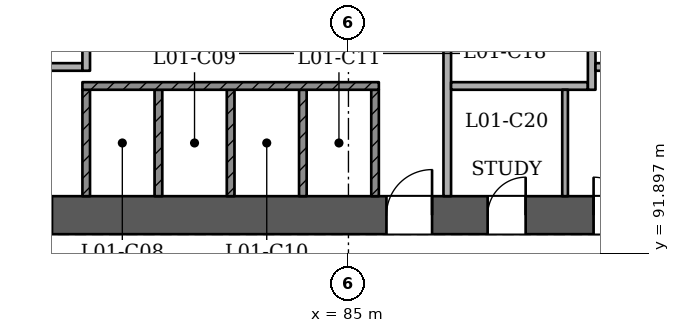
"""IFC4 building model, lengths in metres.
Left out: names, types, materials, properties, quantities, classifications, styles, units other than length and angle.
Written with IfcOpenShell. Run it as: python <this file> out.ifc"""

import sys

from ifc_helpers import new_model, si_unit, direction, frame, frame_2d, origin, place, context, subcontext, project, spatial, rectangle, extrude, element, fill, save


model = new_model("IFC4")
c1 = context("Model", 3, precision=1e-05, world=origin(), true_north=direction((0.0, 1.0)))
c2 = subcontext(c1, "Body", "Model", "MODEL_VIEW")
j1 = project(units=[si_unit("LENGTHUNIT", "METRE"), si_unit("PLANEANGLEUNIT", "RADIAN")], contexts=[c1])
p1 = place(None, origin())
s1 = spatial("IfcSite", under=j1, at=p1, CompositionType="ELEMENT")
p2 = place(p1, origin())
s2 = spatial("IfcBuilding", under=s1, at=p2, CompositionType="ELEMENT")
p3 = place(p2, frame((0.0, 0.0, 9.0)))
s3 = spatial("IfcBuildingStorey", under=s2, at=p3, CompositionType="ELEMENT", Elevation=9.0)
p4 = place(p3, frame((72.5, 92.9, 0.0), z_axis=(0.0, 0.0, 1.0), x_axis=(1.0, 0.0, 0.0)))
e1 = element("IfcWall", 1, at=p4, inside=s3, PredefinedType="SHEAR", context=c2, shape_type="SweptSolid", body=[
    extrude(rectangle(XDim=25.5, YDim=1.0, at=frame_2d((12.75, 0.0))), origin(), (0.0, 0.0, 1.0), 4.5),
])
p5 = place(p4, frame((1.3, 0.0, 0.0)))
e2 = element("IfcOpeningElement", 2, at=p5, cuts=e1, PredefinedType="OPENING", context=c2, shape_type="SweptSolid", body=[
    extrude(rectangle(XDim=1.2, YDim=2.1, at=frame_2d((0.6, 1.05))), frame((0.0, 0.51, 0.0), z_axis=(0.0, -1.0, 0.0), x_axis=(1.0, 0.0, 0.0)), (0.0, 0.0, 1.0), 1.021),
])
p6 = place(p4, frame((3.5, 0.0, 0.0)))
e3 = element("IfcOpeningElement", 3, at=p6, cuts=e1, PredefinedType="OPENING", context=c2, shape_type="SweptSolid", body=[
    extrude(rectangle(XDim=1.2, YDim=2.1, at=frame_2d((0.6, 1.05))), frame((0.0, 0.51, 0.0), z_axis=(0.0, -1.0, 0.0), x_axis=(1.0, 0.0, 0.0)), (0.0, 0.0, 1.0), 1.021),
])
p7 = place(p4, frame((13.5, 0.0, 0.0)))
e4 = element("IfcOpeningElement", 4, at=p7, cuts=e1, PredefinedType="OPENING", context=c2, shape_type="SweptSolid", body=[
    extrude(rectangle(XDim=1.2, YDim=2.1, at=frame_2d((0.6, 1.05))), frame((0.0, 0.51, 0.0), z_axis=(0.0, -1.0, 0.0), x_axis=(1.0, 0.0, 0.0)), (0.0, 0.0, 1.0), 1.021),
])
p8 = place(p4, frame((16.163, 0.0, 0.0)))
e5 = element("IfcOpeningElement", 5, at=p8, cuts=e1, PredefinedType="OPENING", context=c2, shape_type="SweptSolid", body=[
    extrude(rectangle(XDim=1.0, YDim=2.1, at=frame_2d((0.5, 1.05))), frame((0.0, 0.51, 0.0), z_axis=(0.0, -1.0, 0.0), x_axis=(1.0, 0.0, 0.0)), (0.0, 0.0, 1.0), 1.021),
])
p9 = place(p4, frame((18.95, 0.0, 0.0)))
e6 = element("IfcOpeningElement", 6, at=p9, cuts=e1, PredefinedType="OPENING", context=c2, shape_type="SweptSolid", body=[
    extrude(rectangle(XDim=1.0, YDim=2.1, at=frame_2d((0.5, 1.05))), frame((0.0, 0.51, 0.0), z_axis=(0.0, -1.0, 0.0), x_axis=(1.0, 0.0, 0.0)), (0.0, 0.0, 1.0), 1.021),
])
p10 = place(p4, frame((22.137, 0.0, 0.0)))
e7 = element("IfcOpeningElement", 7, at=p10, cuts=e1, PredefinedType="OPENING", context=c2, shape_type="SweptSolid", body=[
    extrude(rectangle(XDim=1.0, YDim=2.1, at=frame_2d((0.5, 1.05))), frame((0.0, 0.51, 0.0), z_axis=(0.0, -1.0, 0.0), x_axis=(1.0, 0.0, 0.0)), (0.0, 0.0, 1.0), 1.021),
])
p11 = place(p3, frame((55.57, 95.474, 0.0), z_axis=(0.0, 0.0, 1.0), x_axis=(0.500000085768, -0.866025354266, 0.0)))
e8 = element("IfcWall", 8, at=p11, inside=s3, PredefinedType="PARTITIONING", context=c2, shape_type="SweptSolid", body=[
    extrude(rectangle(XDim=55.365, YDim=0.15, at=frame_2d((27.682, 0.0))), origin(), (0.0, 0.0, 1.0), 4.05),
])
p12 = place(p11, frame((6.832, 0.0, 0.0)))
e9 = element("IfcOpeningElement", 9, at=p12, cuts=e8, PredefinedType="OPENING", context=c2, shape_type="SweptSolid", body=[
    extrude(rectangle(XDim=1.2, YDim=2.1, at=frame_2d((0.6, 1.05))), frame((0.0, 0.085, 0.0), z_axis=(0.0, -1.0, 0.0), x_axis=(1.0, 0.0, 0.0)), (0.0, 0.0, 1.0), 0.171),
])
p13 = place(p11, frame((18.182, 0.0, 0.0)))
e10 = element("IfcOpeningElement", 10, at=p13, cuts=e8, PredefinedType="OPENING", context=c2, shape_type="SweptSolid", body=[
    extrude(rectangle(XDim=1.0, YDim=2.1, at=frame_2d((0.5, 1.05))), frame((0.0, 0.085, 0.0), z_axis=(0.0, -1.0, 0.0), x_axis=(1.0, 0.0, 0.0)), (0.0, 0.0, 1.0), 0.171),
])
p14 = place(p11, frame((30.132, 0.0, 0.0)))
e11 = element("IfcOpeningElement", 11, at=p14, cuts=e8, PredefinedType="OPENING", context=c2, shape_type="SweptSolid", body=[
    extrude(rectangle(XDim=1.2, YDim=2.1, at=frame_2d((0.6, 1.05))), frame((0.0, 0.085, 0.0), z_axis=(0.0, -1.0, 0.0), x_axis=(1.0, 0.0, 0.0)), (0.0, 0.0, 1.0), 0.171),
])
p15 = place(p11, frame((40.582, 0.0, 0.0)))
e12 = element("IfcOpeningElement", 12, at=p15, cuts=e8, PredefinedType="OPENING", context=c2, shape_type="SweptSolid", body=[
    extrude(rectangle(XDim=1.2, YDim=2.1, at=frame_2d((0.6, 1.05))), frame((0.0, 0.085, 0.0), z_axis=(0.0, -1.0, 0.0), x_axis=(1.0, 0.0, 0.0)), (0.0, 0.0, 1.0), 0.171),
])
p16 = place(p11, frame((46.315, 0.0, 0.0)))
e13 = element("IfcOpeningElement", 13, at=p16, cuts=e8, PredefinedType="OPENING", context=c2, shape_type="SweptSolid", body=[
    extrude(rectangle(XDim=0.9, YDim=2.1, at=frame_2d((0.45, 1.05))), frame((0.0, 0.085, 0.0), z_axis=(0.0, -1.0, 0.0), x_axis=(1.0, 0.0, 0.0)), (0.0, 0.0, 1.0), 0.171),
])
p17 = place(p11, frame((48.565, 0.0, 0.0)))
e14 = element("IfcOpeningElement", 14, at=p17, cuts=e8, PredefinedType="OPENING", context=c2, shape_type="SweptSolid", body=[
    extrude(rectangle(XDim=0.9, YDim=2.1, at=frame_2d((0.45, 1.05))), frame((0.0, 0.085, 0.0), z_axis=(0.0, -1.0, 0.0), x_axis=(1.0, 0.0, 0.0)), (0.0, 0.0, 1.0), 0.171),
])
p18 = place(p11, frame((53.195, 0.0, 0.0)))
e15 = element("IfcOpeningElement", 15, at=p18, cuts=e8, PredefinedType="OPENING", context=c2, shape_type="SweptSolid", body=[
    extrude(rectangle(XDim=1.2, YDim=2.1, at=frame_2d((0.6, 1.05))), frame((0.0, 0.085, 0.0), z_axis=(0.0, -1.0, 0.0), x_axis=(1.0, 0.0, 0.0)), (0.0, 0.0, 1.0), 0.171),
])
p19 = place(p3, frame((86.747, 47.526, 0.0), z_axis=(0.0, 0.0, 1.0), x_axis=(0.500000085768, 0.866025354266, 0.0)))
e16 = element("IfcWall", 16, at=p19, inside=s3, PredefinedType="PARTITIONING", context=c2, shape_type="SweptSolid", body=[
    extrude(rectangle(XDim=55.365, YDim=0.15, at=frame_2d((27.682, 0.0))), origin(), (0.0, 0.0, 1.0), 4.05),
])
p20 = place(p19, frame((0.97, 0.0, 0.0)))
e17 = element("IfcOpeningElement", 17, at=p20, cuts=e16, PredefinedType="OPENING", context=c2, shape_type="SweptSolid", body=[
    extrude(rectangle(XDim=1.2, YDim=2.1, at=frame_2d((0.6, 1.05))), frame((0.0, 0.085, 0.0), z_axis=(0.0, -1.0, 0.0), x_axis=(1.0, 0.0, 0.0)), (0.0, 0.0, 1.0), 0.171),
])
p21 = place(p19, frame((9.082, 0.0, 0.0)))
e18 = element("IfcOpeningElement", 18, at=p21, cuts=e16, PredefinedType="OPENING", context=c2, shape_type="SweptSolid", body=[
    extrude(rectangle(XDim=1.2, YDim=2.1, at=frame_2d((0.6, 1.05))), frame((0.0, 0.085, 0.0), z_axis=(0.0, -1.0, 0.0), x_axis=(1.0, 0.0, 0.0)), (0.0, 0.0, 1.0), 0.171),
])
p22 = place(p19, frame((18.082, 0.0, 0.0)))
e19 = element("IfcOpeningElement", 19, at=p22, cuts=e16, PredefinedType="OPENING", context=c2, shape_type="SweptSolid", body=[
    extrude(rectangle(XDim=1.2, YDim=2.1, at=frame_2d((0.6, 1.05))), frame((0.0, 0.085, 0.0), z_axis=(0.0, -1.0, 0.0), x_axis=(1.0, 0.0, 0.0)), (0.0, 0.0, 1.0), 0.171),
])
p23 = place(p19, frame((23.613, 0.0, 0.0)))
e20 = element("IfcOpeningElement", 20, at=p23, cuts=e16, PredefinedType="OPENING", context=c2, shape_type="SweptSolid", body=[
    extrude(rectangle(XDim=1.0, YDim=2.1, at=frame_2d((0.5, 1.05))), frame((0.0, 0.085, 0.0), z_axis=(0.0, -1.0, 0.0), x_axis=(1.0, 0.0, 0.0)), (0.0, 0.0, 1.0), 0.171),
])
p24 = place(p19, frame((26.363, 0.0, 0.0)))
e21 = element("IfcOpeningElement", 21, at=p24, cuts=e16, PredefinedType="OPENING", context=c2, shape_type="SweptSolid", body=[
    extrude(rectangle(XDim=1.0, YDim=2.1, at=frame_2d((0.5, 1.05))), frame((0.0, 0.085, 0.0), z_axis=(0.0, -1.0, 0.0), x_axis=(1.0, 0.0, 0.0)), (0.0, 0.0, 1.0), 0.171),
])
p25 = place(p19, frame((33.032, 0.0, 0.0)))
e22 = element("IfcOpeningElement", 22, at=p25, cuts=e16, PredefinedType="OPENING", context=c2, shape_type="SweptSolid", body=[
    extrude(rectangle(XDim=1.2, YDim=2.1, at=frame_2d((0.6, 1.05))), frame((0.0, 0.085, 0.0), z_axis=(0.0, -1.0, 0.0), x_axis=(1.0, 0.0, 0.0)), (0.0, 0.0, 1.0), 0.171),
])
p26 = place(p19, frame((47.337, 0.0, 0.0)))
e23 = element("IfcOpeningElement", 23, at=p26, cuts=e16, PredefinedType="OPENING", context=c2, shape_type="SweptSolid", body=[
    extrude(rectangle(XDim=1.2, YDim=2.1, at=frame_2d((0.6, 1.05))), frame((0.0, 0.085, 0.0), z_axis=(0.0, -1.0, 0.0), x_axis=(1.0, 0.0, 0.0)), (0.0, 0.0, 1.0), 0.171),
])
p27 = place(p3, frame((79.673, 41.126, 0.0), z_axis=(0.0, 0.0, 1.0), x_axis=(-0.499997306052, 0.866026959131, 0.0)))
e24 = element("IfcWall", 24, at=p27, inside=s3, PredefinedType="SOLIDWALL", context=c2, shape_type="SweptSolid", body=[
    extrude(rectangle(XDim=62.87, YDim=0.4, at=frame_2d((31.435, 0.0))), origin(), (0.0, 0.0, 1.0), 4.05),
])
p28 = place(p27, frame((54.986, 0.0, 0.9)))
e25 = element("IfcOpeningElement", 25, at=p28, cuts=e24, PredefinedType="OPENING", context=c2, shape_type="SweptSolid", body=[
    extrude(rectangle(XDim=2.4, YDim=1.5, at=frame_2d((1.2, 0.75))), frame((0.0, 0.21, 0.0), z_axis=(0.0, -1.0, 0.0), x_axis=(1.0, 0.0, 0.0)), (0.0, 0.0, 1.0), 0.421),
])
p29 = place(p27, frame((50.486, 0.0, 0.9)))
e26 = element("IfcOpeningElement", 26, at=p29, cuts=e24, PredefinedType="OPENING", context=c2, shape_type="SweptSolid", body=[
    extrude(rectangle(XDim=2.4, YDim=1.5, at=frame_2d((1.2, 0.75))), frame((0.0, 0.21, 0.0), z_axis=(0.0, -1.0, 0.0), x_axis=(1.0, 0.0, 0.0)), (0.0, 0.0, 1.0), 0.421),
])
p30 = place(p27, frame((45.986, 0.0, 0.9)))
e27 = element("IfcOpeningElement", 27, at=p30, cuts=e24, PredefinedType="OPENING", context=c2, shape_type="SweptSolid", body=[
    extrude(rectangle(XDim=2.4, YDim=1.5, at=frame_2d((1.2, 0.75))), frame((0.0, 0.21, 0.0), z_axis=(0.0, -1.0, 0.0), x_axis=(1.0, 0.0, 0.0)), (0.0, 0.0, 1.0), 0.421),
])
p31 = place(p27, frame((32.486, 0.0, 0.9)))
e28 = element("IfcOpeningElement", 28, at=p31, cuts=e24, PredefinedType="OPENING", context=c2, shape_type="SweptSolid", body=[
    extrude(rectangle(XDim=2.4, YDim=1.5, at=frame_2d((1.2, 0.75))), frame((0.0, 0.21, 0.0), z_axis=(0.0, -1.0, 0.0), x_axis=(1.0, 0.0, 0.0)), (0.0, 0.0, 1.0), 0.421),
])
p32 = place(p27, frame((27.986, 0.0, 0.9)))
e29 = element("IfcOpeningElement", 29, at=p32, cuts=e24, PredefinedType="OPENING", context=c2, shape_type="SweptSolid", body=[
    extrude(rectangle(XDim=2.4, YDim=1.5, at=frame_2d((1.2, 0.75))), frame((0.0, 0.21, 0.0), z_axis=(0.0, -1.0, 0.0), x_axis=(1.0, 0.0, 0.0)), (0.0, 0.0, 1.0), 0.421),
])
p33 = place(p27, frame((23.486, 0.0, 0.9)))
e30 = element("IfcOpeningElement", 30, at=p33, cuts=e24, PredefinedType="OPENING", context=c2, shape_type="SweptSolid", body=[
    extrude(rectangle(XDim=2.4, YDim=1.5, at=frame_2d((1.2, 0.75))), frame((0.0, 0.21, 0.0), z_axis=(0.0, -1.0, 0.0), x_axis=(1.0, 0.0, 0.0)), (0.0, 0.0, 1.0), 0.421),
])
p34 = place(p27, frame((18.986, 0.0, 0.9)))
e31 = element("IfcOpeningElement", 31, at=p34, cuts=e24, PredefinedType="OPENING", context=c2, shape_type="SweptSolid", body=[
    extrude(rectangle(XDim=2.4, YDim=1.5, at=frame_2d((1.2, 0.75))), frame((0.0, 0.21, 0.0), z_axis=(0.0, -1.0, 0.0), x_axis=(1.0, 0.0, 0.0)), (0.0, 0.0, 1.0), 0.421),
])
p35 = place(p27, frame((14.486, 0.0, 0.9)))
e32 = element("IfcOpeningElement", 32, at=p35, cuts=e24, PredefinedType="OPENING", context=c2, shape_type="SweptSolid", body=[
    extrude(rectangle(XDim=2.4, YDim=1.5, at=frame_2d((1.2, 0.75))), frame((0.0, 0.21, 0.0), z_axis=(0.0, -1.0, 0.0), x_axis=(1.0, 0.0, 0.0)), (0.0, 0.0, 1.0), 0.421),
])
p36 = place(p3, frame((121.762, 95.574, 0.0), z_axis=(0.0, 0.0, 1.0), x_axis=(-0.499997306052, -0.866026959131, 0.0)))
e33 = element("IfcWall", 33, at=p36, inside=s3, PredefinedType="SOLIDWALL", context=c2, shape_type="SweptSolid", body=[
    extrude(rectangle(XDim=62.87, YDim=0.4, at=frame_2d((31.435, 0.0))), origin(), (0.0, 0.0, 1.0), 4.05),
])
p37 = place(p36, frame((59.452, 0.0, 0.9)))
e34 = element("IfcOpeningElement", 34, at=p37, cuts=e33, PredefinedType="OPENING", context=c2, shape_type="SweptSolid", body=[
    extrude(rectangle(XDim=2.4, YDim=1.5, at=frame_2d((1.2, 0.75))), frame((0.0, 0.21, 0.0), z_axis=(0.0, -1.0, 0.0), x_axis=(1.0, 0.0, 0.0)), (0.0, 0.0, 1.0), 0.421),
])
p38 = place(p36, frame((54.986, 0.0, 0.9)))
e35 = element("IfcOpeningElement", 35, at=p38, cuts=e33, PredefinedType="OPENING", context=c2, shape_type="SweptSolid", body=[
    extrude(rectangle(XDim=2.4, YDim=1.5, at=frame_2d((1.2, 0.75))), frame((0.0, 0.21, 0.0), z_axis=(0.0, -1.0, 0.0), x_axis=(1.0, 0.0, 0.0)), (0.0, 0.0, 1.0), 0.421),
])
p39 = place(p36, frame((50.486, 0.0, 0.9)))
e36 = element("IfcOpeningElement", 36, at=p39, cuts=e33, PredefinedType="OPENING", context=c2, shape_type="SweptSolid", body=[
    extrude(rectangle(XDim=2.4, YDim=1.5, at=frame_2d((1.2, 0.75))), frame((0.0, 0.21, 0.0), z_axis=(0.0, -1.0, 0.0), x_axis=(1.0, 0.0, 0.0)), (0.0, 0.0, 1.0), 0.421),
])
p40 = place(p36, frame((45.986, 0.0, 0.9)))
e37 = element("IfcOpeningElement", 37, at=p40, cuts=e33, PredefinedType="OPENING", context=c2, shape_type="SweptSolid", body=[
    extrude(rectangle(XDim=2.4, YDim=1.5, at=frame_2d((1.2, 0.75))), frame((0.0, 0.21, 0.0), z_axis=(0.0, -1.0, 0.0), x_axis=(1.0, 0.0, 0.0)), (0.0, 0.0, 1.0), 0.421),
])
p41 = place(p36, frame((41.486, 0.0, 0.9)))
e38 = element("IfcOpeningElement", 38, at=p41, cuts=e33, PredefinedType="OPENING", context=c2, shape_type="SweptSolid", body=[
    extrude(rectangle(XDim=2.4, YDim=1.5, at=frame_2d((1.2, 0.75))), frame((0.0, 0.21, 0.0), z_axis=(0.0, -1.0, 0.0), x_axis=(1.0, 0.0, 0.0)), (0.0, 0.0, 1.0), 0.421),
])
p42 = place(p36, frame((36.986, 0.0, 0.9)))
e39 = element("IfcOpeningElement", 39, at=p42, cuts=e33, PredefinedType="OPENING", context=c2, shape_type="SweptSolid", body=[
    extrude(rectangle(XDim=2.4, YDim=1.5, at=frame_2d((1.2, 0.75))), frame((0.0, 0.21, 0.0), z_axis=(0.0, -1.0, 0.0), x_axis=(1.0, 0.0, 0.0)), (0.0, 0.0, 1.0), 0.421),
])
p43 = place(p36, frame((23.486, 0.0, 0.9)))
e40 = element("IfcOpeningElement", 40, at=p43, cuts=e33, PredefinedType="OPENING", context=c2, shape_type="SweptSolid", body=[
    extrude(rectangle(XDim=2.4, YDim=1.5, at=frame_2d((1.2, 0.75))), frame((0.0, 0.21, 0.0), z_axis=(0.0, -1.0, 0.0), x_axis=(1.0, 0.0, 0.0)), (0.0, 0.0, 1.0), 0.421),
])
p44 = place(p36, frame((18.986, 0.0, 0.9)))
e41 = element("IfcOpeningElement", 41, at=p44, cuts=e33, PredefinedType="OPENING", context=c2, shape_type="SweptSolid", body=[
    extrude(rectangle(XDim=2.4, YDim=1.5, at=frame_2d((1.2, 0.75))), frame((0.0, 0.21, 0.0), z_axis=(0.0, -1.0, 0.0), x_axis=(1.0, 0.0, 0.0)), (0.0, 0.0, 1.0), 0.421),
])
p45 = place(p36, frame((14.486, 0.0, 0.9)))
e42 = element("IfcOpeningElement", 42, at=p45, cuts=e33, PredefinedType="OPENING", context=c2, shape_type="SweptSolid", body=[
    extrude(rectangle(XDim=2.4, YDim=1.5, at=frame_2d((1.2, 0.75))), frame((0.0, 0.21, 0.0), z_axis=(0.0, -1.0, 0.0), x_axis=(1.0, 0.0, 0.0)), (0.0, 0.0, 1.0), 0.421),
])
p46 = place(p36, frame((5.486, 0.0, 0.9)))
e43 = element("IfcOpeningElement", 43, at=p46, cuts=e33, PredefinedType="OPENING", context=c2, shape_type="SweptSolid", body=[
    extrude(rectangle(XDim=2.4, YDim=1.5, at=frame_2d((1.2, 0.75))), frame((0.0, 0.21, 0.0), z_axis=(0.0, -1.0, 0.0), x_axis=(1.0, 0.0, 0.0)), (0.0, 0.0, 1.0), 0.421),
])
p47 = place(p36, frame((1.018, 0.0, 0.9)))
e44 = element("IfcOpeningElement", 44, at=p47, cuts=e33, PredefinedType="OPENING", context=c2, shape_type="SweptSolid", body=[
    extrude(rectangle(XDim=2.4, YDim=1.5, at=frame_2d((1.2, 0.75))), frame((0.0, 0.21, 0.0), z_axis=(0.0, -1.0, 0.0), x_axis=(1.0, 0.0, 0.0)), (0.0, 0.0, 1.0), 0.421),
])
for number, where, z_axis, x_axis in (
    (45, (78.1, 93.4, 0.0), (0.0, 0.0, 1.0), (0.0, 1.0, 0.0)),
    (46, (80.0, 93.4, 0.0), (0.0, 0.0, 1.0), (0.0, 1.0, 0.0)),
    (47, (81.9, 93.4, 0.0), (0.0, 0.0, 1.0), (0.0, 1.0, 0.0)),
    (48, (83.8, 93.4, 0.0), (0.0, 0.0, 1.0), (0.0, 1.0, 0.0)),
    (49, (85.7, 93.4, 0.0), (0.0, 0.0, 1.0), (0.0, 1.0, 0.0)),
):
    element("IfcWall", number, at=place(p3, frame(where, z_axis=z_axis, x_axis=x_axis)), inside=s3, PredefinedType="SOLIDWALL", context=c2, shape_type="SweptSolid", body=[
        extrude(rectangle(XDim=2.8, YDim=0.2, at=frame_2d((1.4, 0.0))), origin(), (0.0, 0.0, 1.0), 4.05),
    ])
p48 = place(p3, frame((87.6, 93.4, 0.0), z_axis=(0.0, 0.0, 1.0), x_axis=(0.0, 1.0, 0.0)))
e50 = element("IfcWall", 50, at=p48, inside=s3, PredefinedType="PARTITIONING", context=c2, shape_type="SweptSolid", body=[
    extrude(rectangle(XDim=7.0, YDim=0.2, at=frame_2d((3.5, 0.0))), origin(), (0.0, 0.0, 1.0), 4.05),
])
p49 = place(p48, frame((4.45, 0.0, 0.0)))
e51 = element("IfcOpeningElement", 51, at=p49, cuts=e50, PredefinedType="OPENING", context=c2, shape_type="SweptSolid", body=[
    extrude(rectangle(XDim=1.1, YDim=2.1, at=frame_2d((0.55, 1.05))), frame((0.0, 0.11, 0.0), z_axis=(0.0, -1.0, 0.0), x_axis=(1.0, 0.0, 0.0)), (0.0, 0.0, 1.0), 0.221),
])
p50 = place(p3, frame((90.7, 93.4, 0.0), z_axis=(0.0, 0.0, 1.0), x_axis=(0.0, 1.0, 0.0)))
e52 = element("IfcWall", 52, at=p50, inside=s3, PredefinedType="PARTITIONING", context=c2, shape_type="SweptSolid", body=[
    extrude(rectangle(XDim=2.8, YDim=0.15, at=frame_2d((1.4, 0.0))), origin(), (0.0, 0.0, 1.0), 4.05),
])
p51 = place(p3, frame((78.0, 96.3, 0.0), z_axis=(0.0, 0.0, 1.0), x_axis=(1.0, 0.0, 0.0)))
e53 = element("IfcWall", 53, at=p51, inside=s3, PredefinedType="SOLIDWALL", context=c2, shape_type="SweptSolid", body=[
    extrude(rectangle(XDim=7.8, YDim=0.2, at=frame_2d((3.9, 0.0))), origin(), (0.0, 0.0, 1.0), 4.05),
])
p52 = place(p3, frame((87.7, 96.3, 0.0), z_axis=(0.0, 0.0, 1.0), x_axis=(1.0, 0.0, 0.0)))
e54 = element("IfcWall", 54, at=p52, inside=s3, PredefinedType="PARTITIONING", context=c2, shape_type="SweptSolid", body=[
    extrude(rectangle(XDim=3.6, YDim=0.2, at=frame_2d((1.8, 0.0))), origin(), (0.0, 0.0, 1.0), 4.05),
])
p53 = place(p3, frame((91.4, 96.2, 0.0), z_axis=(0.0, 0.0, 1.0), x_axis=(0.0, 1.0, 0.0)))
e55 = element("IfcWall", 55, at=p53, inside=s3, PredefinedType="PARTITIONING", context=c2, shape_type="SweptSolid", body=[
    extrude(rectangle(XDim=4.2, YDim=0.2, at=frame_2d((2.1, 0.0))), origin(), (0.0, 0.0, 1.0), 4.05),
])
p54 = place(p53, frame((2.45, 0.0, 0.0)))
e56 = element("IfcOpeningElement", 56, at=p54, cuts=e55, PredefinedType="OPENING", context=c2, shape_type="SweptSolid", body=[
    extrude(rectangle(XDim=1.1, YDim=2.1, at=frame_2d((0.55, 1.05))), frame((0.0, 0.11, 0.0), z_axis=(0.0, -1.0, 0.0), x_axis=(1.0, 0.0, 0.0)), (0.0, 0.0, 1.0), 0.221),
])
p55 = place(p3, frame((76.1, 96.8, 0.0), z_axis=(0.0, 0.0, 1.0), x_axis=(1.0, 0.0, 0.0)))
e57 = element("IfcWall", 57, at=p55, inside=s3, PredefinedType="PARTITIONING", context=c2, shape_type="SweptSolid", body=[
    extrude(rectangle(XDim=1.9, YDim=0.2, at=frame_2d((0.95, 0.0))), origin(), (0.0, 0.0, 1.0), 4.05),
])
p56 = place(p3, frame((78.1, 96.7, 0.0), z_axis=(0.0, 0.0, 1.0), x_axis=(0.0, 1.0, 0.0)))
e58 = element("IfcWall", 58, at=p56, inside=s3, PredefinedType="PARTITIONING", context=c2, shape_type="SweptSolid", body=[
    extrude(rectangle(XDim=3.7, YDim=0.2, at=frame_2d((1.85, 0.0))), origin(), (0.0, 0.0, 1.0), 4.05),
])
p57 = place(p56, frame((1.95, 0.0, 0.0)))
e59 = element("IfcOpeningElement", 59, at=p57, cuts=e58, PredefinedType="OPENING", context=c2, shape_type="SweptSolid", body=[
    extrude(rectangle(XDim=1.1, YDim=2.1, at=frame_2d((0.55, 1.05))), frame((0.0, 0.11, 0.0), z_axis=(0.0, -1.0, 0.0), x_axis=(1.0, 0.0, 0.0)), (0.0, 0.0, 1.0), 0.221),
])
p58 = place(p3, frame((91.5, 96.8, 0.0), z_axis=(0.0, 0.0, 1.0), x_axis=(1.0, 0.0, 0.0)))
e60 = element("IfcWall", 60, at=p58, inside=s3, PredefinedType="PARTITIONING", context=c2, shape_type="SweptSolid", body=[
    extrude(rectangle(XDim=2.4, YDim=0.2, at=frame_2d((1.2, 0.0))), origin(), (0.0, 0.0, 1.0), 4.05),
])
p59 = place(p6, origin())
e61 = element("IfcDoor", 61, at=p59, inside=s3, OperationType="SINGLE_SWING_LEFT", PredefinedType="NOTDEFINED", context=c2, shape_type="SweptSolid", body=[
    extrude(rectangle(XDim=1.2, YDim=2.1, at=frame_2d((0.6, 1.05))), frame((0.0, 0.025, 0.0), z_axis=(0.0, -1.0, 0.0), x_axis=(1.0, 0.0, 0.0)), (0.0, 0.0, 1.0), 0.05),
])
fill(e3, e61)
p60 = place(p7, origin())
e62 = element("IfcDoor", 62, at=p60, inside=s3, OperationType="SINGLE_SWING_RIGHT", PredefinedType="NOTDEFINED", context=c2, shape_type="SweptSolid", body=[
    extrude(rectangle(XDim=1.2, YDim=2.1, at=frame_2d((0.6, 1.05))), frame((0.0, 0.025, 0.0), z_axis=(0.0, -1.0, 0.0), x_axis=(1.0, 0.0, 0.0)), (0.0, 0.0, 1.0), 0.05),
])
fill(e4, e62)
p61 = place(p8, origin())
e63 = element("IfcDoor", 63, at=p61, inside=s3, OperationType="SINGLE_SWING_RIGHT", PredefinedType="NOTDEFINED", context=c2, shape_type="SweptSolid", body=[
    extrude(rectangle(XDim=1.0, YDim=2.1, at=frame_2d((0.5, 1.05))), frame((0.0, 0.025, 0.0), z_axis=(0.0, -1.0, 0.0), x_axis=(1.0, 0.0, 0.0)), (0.0, 0.0, 1.0), 0.05),
])
fill(e5, e63)
p62 = place(p9, origin())
e64 = element("IfcDoor", 64, at=p62, inside=s3, OperationType="SINGLE_SWING_LEFT", PredefinedType="NOTDEFINED", context=c2, shape_type="SweptSolid", body=[
    extrude(rectangle(XDim=1.0, YDim=2.1, at=frame_2d((0.5, 1.05))), frame((0.0, 0.025, 0.0), z_axis=(0.0, -1.0, 0.0), x_axis=(1.0, 0.0, 0.0)), (0.0, 0.0, 1.0), 0.05),
])
fill(e6, e64)
save(model, sys.argv[1])
